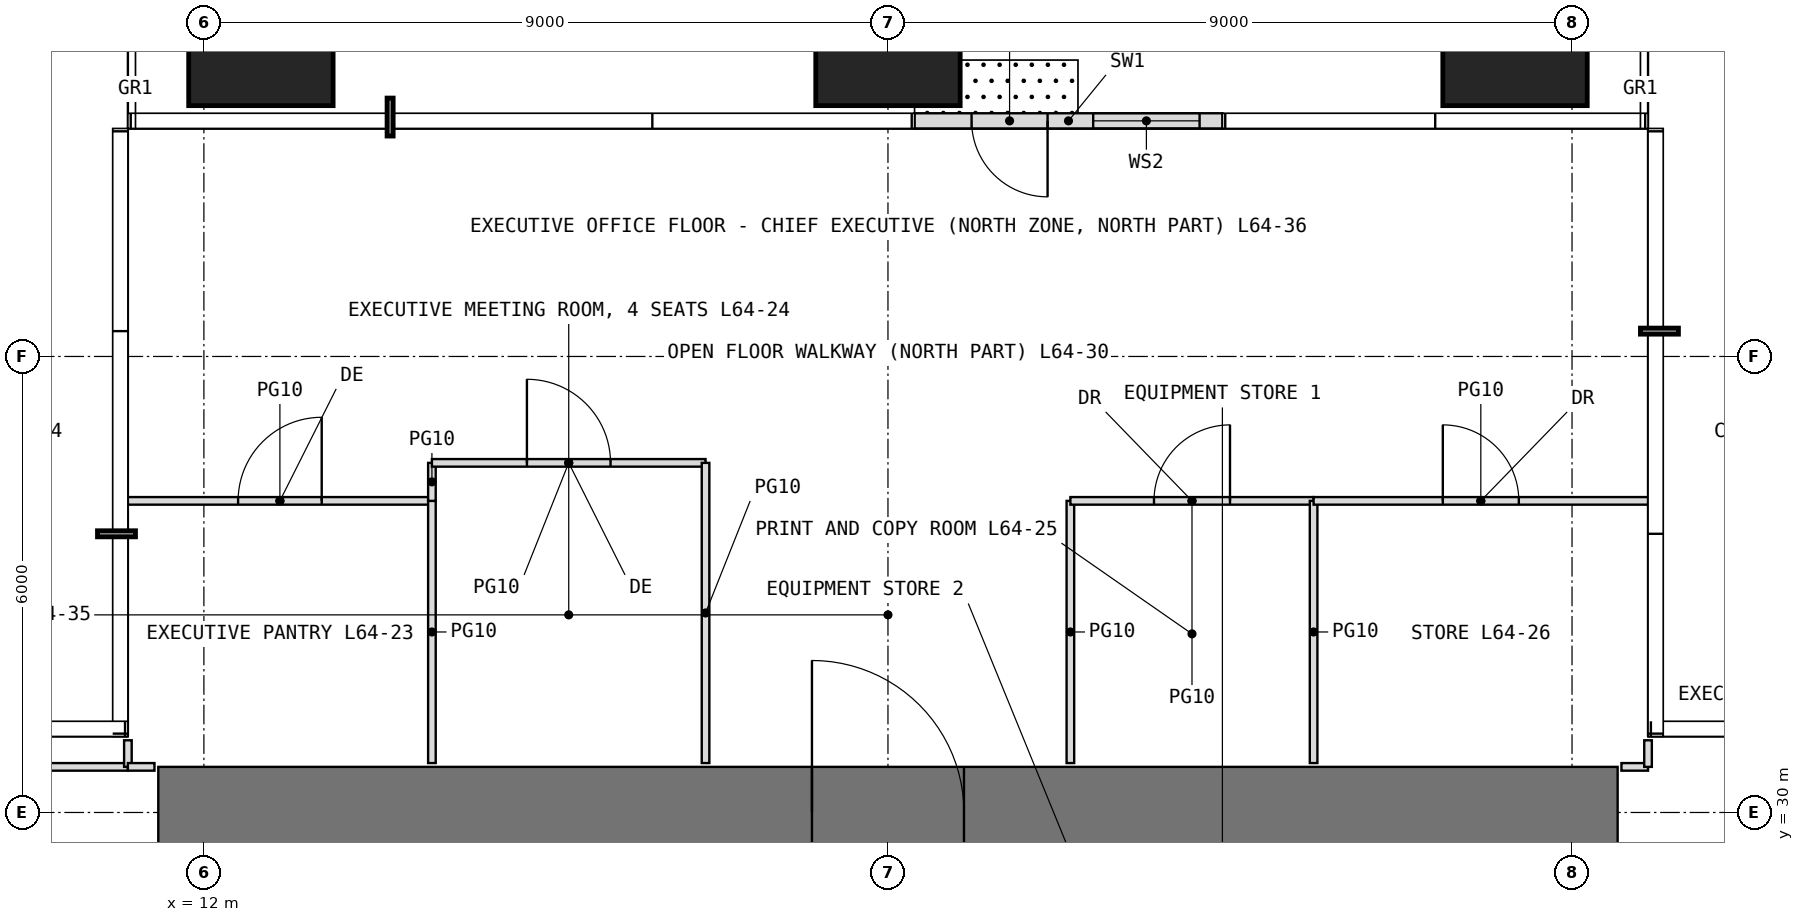
"""IFC4 building model, lengths in metres.
Left out: names, types, materials, properties, quantities, classifications, styles, units other than length and angle.
Written with IfcOpenShell. Run it as: python <this file> out.ifc"""

import sys

from ifc_helpers import new_model, si_unit, direction, frame, frame_2d, origin, origin_2d, place, context, subcontext, project, spatial, rectangle, extrude, element, fill, save


model = new_model("IFC4")
c1 = context("Model", 3, precision=1e-05, world=origin(), true_north=direction((0.0, 1.0)))
c2 = subcontext(c1, "Body", "Model", "MODEL_VIEW")
j1 = project(units=[si_unit("LENGTHUNIT", "METRE"), si_unit("PLANEANGLEUNIT", "RADIAN")], contexts=[c1])
p1 = place(None, origin())
s1 = spatial("IfcSite", under=j1, at=p1, CompositionType="ELEMENT")
p2 = place(p1, origin())
s2 = spatial("IfcBuilding", under=s1, at=p2, CompositionType="ELEMENT")
p3 = place(p2, frame((0.0, 0.0, 269.2)))
s3 = spatial("IfcBuildingStorey", under=s2, at=p3, CompositionType="ELEMENT", Elevation=269.2)
for number, where, z_axis, x_axis in (
    (1, (12.75, 40.25, 0.0), (0.0, 0.0, 1.0), (1.0, 0.0, 0.0)),
    (2, (21.0, 40.25, 0.0), (0.0, 0.0, 1.0), (1.0, 0.0, 0.0)),
    (3, (29.25, 40.25, 0.0), (0.0, 0.0, 1.0), (1.0, 0.0, 0.0)),
):
    element("IfcColumn", number, at=place(p3, frame(where, z_axis=z_axis, x_axis=x_axis)), inside=s3, PredefinedType="COLUMN", context=c2, shape_type="SweptSolid", body=[
        extrude(rectangle(XDim=1.9, YDim=1.9, at=origin_2d()), origin(), (0.0, 0.0, 1.0), 4.2),
    ])
p4 = place(p3, frame((25.4, 39.1, 0.0), z_axis=(0.0, 0.0, 1.0), x_axis=(-1.0, 0.0, 0.0)))
e4 = element("IfcWall", 4, at=p4, inside=s3, PredefinedType="USERDEFINED", context=c2, shape_type="SweptSolid", body=[
    extrude(rectangle(XDim=4.05, YDim=0.2, at=frame_2d((2.025, 0.0))), origin(), (0.0, 0.0, 1.0), 3.95),
])
p5 = place(p4, frame((2.3, 0.0, 0.0)))
e5 = element("IfcOpeningElement", 5, at=p5, cuts=e4, PredefinedType="OPENING", context=c2, shape_type="SweptSolid", body=[
    extrude(rectangle(XDim=1.0, YDim=2.4, at=frame_2d((0.5, 1.2))), frame((0.0, 0.11, 0.0), z_axis=(0.0, -1.0, 0.0), x_axis=(1.0, 0.0, 0.0)), (0.0, 0.0, 1.0), 0.22),
])
p6 = place(p4, frame((0.3, 0.0, 0.3)))
e6 = element("IfcOpeningElement", 6, at=p6, cuts=e4, PredefinedType="OPENING", context=c2, shape_type="SweptSolid", body=[
    extrude(rectangle(XDim=1.4, YDim=2.7, at=frame_2d((0.7, 1.35))), frame((0.0, 0.11, 0.0), z_axis=(0.0, -1.0, 0.0), x_axis=(1.0, 0.0, 0.0)), (0.0, 0.0, 1.0), 0.22),
])
p7 = place(p3, frame((11.4, 30.0, -0.05), z_axis=(0.0, 0.0, 1.0), x_axis=(1.0, 0.0, 0.0)))
e7 = element("IfcWall", 7, at=p7, inside=s3, PredefinedType="SHEAR", context=c2, shape_type="SweptSolid", body=[
    extrude(rectangle(XDim=19.2, YDim=1.2, at=frame_2d((9.6, 0.0))), origin(), (0.0, 0.0, 1.0), 4.2),
])
p8 = place(p7, frame((8.6, 0.0, 0.05)))
e8 = element("IfcOpeningElement", 8, at=p8, cuts=e7, PredefinedType="OPENING", context=c2, shape_type="SweptSolid", body=[
    extrude(rectangle(XDim=2.0, YDim=2.2, at=frame_2d((1.0, 1.1))), frame((0.0, 0.61, 0.0), z_axis=(0.0, -1.0, 0.0), x_axis=(1.0, 0.0, 0.0)), (0.0, 0.0, 1.0), 1.22),
])
p9 = place(p3, frame((8.4, 30.6, 0.0), z_axis=(0.0, 0.0, 1.0), x_axis=(1.0, 0.0, 0.0)))
e9 = element("IfcWall", 9, at=p9, inside=s3, PredefinedType="PARTITIONING", context=c2, shape_type="SweptSolid", body=[
    extrude(rectangle(XDim=2.6, YDim=0.1, at=frame_2d((1.3, 0.0))), origin(), (0.0, 0.0, 1.0), 3.95),
])
p10 = place(p3, frame((11.0, 30.6, 0.0), z_axis=(0.0, 0.0, 1.0), x_axis=(0.0, 1.0, 0.0)))
e10 = element("IfcWall", 10, at=p10, inside=s3, PredefinedType="PARTITIONING", context=c2, shape_type="SweptSolid", body=[
    extrude(rectangle(XDim=0.35, YDim=0.1, at=frame_2d((0.175, 0.0))), origin(), (0.0, 0.0, 1.0), 3.95),
])
p11 = place(p3, frame((11.0, 30.6, 0.0), z_axis=(0.0, 0.0, 1.0), x_axis=(1.0, 0.0, 0.0)))
e11 = element("IfcWall", 11, at=p11, inside=s3, PredefinedType="PARTITIONING", context=c2, shape_type="SweptSolid", body=[
    extrude(rectangle(XDim=0.35, YDim=0.1, at=frame_2d((0.175, 0.0))), origin(), (0.0, 0.0, 1.0), 3.95),
])
p12 = place(p3, frame((11.0, 34.1, 0.0), z_axis=(0.0, 0.0, 1.0), x_axis=(1.0, 0.0, 0.0)))
e12 = element("IfcWall", 12, at=p12, inside=s3, PredefinedType="PARTITIONING", context=c2, shape_type="SweptSolid", body=[
    extrude(rectangle(XDim=4.0, YDim=0.1, at=frame_2d((2.0, 0.0))), origin(), (0.0, 0.0, 1.0), 3.95),
])
p13 = place(p12, frame((1.45, 0.0, 0.0)))
e13 = element("IfcOpeningElement", 13, at=p13, cuts=e12, PredefinedType="OPENING", context=c2, shape_type="SweptSolid", body=[
    extrude(rectangle(XDim=1.1, YDim=2.3, at=frame_2d((0.55, 1.15))), frame((0.0, 0.06, 0.0), z_axis=(0.0, -1.0, 0.0), x_axis=(1.0, 0.0, 0.0)), (0.0, 0.0, 1.0), 0.12),
])
p14 = place(p3, frame((15.0, 30.65, 0.0), z_axis=(0.0, 0.0, 1.0), x_axis=(0.0, 1.0, 0.0)))
e14 = element("IfcWall", 14, at=p14, inside=s3, PredefinedType="PARTITIONING", context=c2, shape_type="SweptSolid", body=[
    extrude(rectangle(XDim=3.45, YDim=0.1, at=frame_2d((1.725, 0.0))), origin(), (0.0, 0.0, 1.0), 3.95),
])
p15 = place(p3, frame((15.0, 34.1, 0.0), z_axis=(0.0, 0.0, 1.0), x_axis=(0.0, 1.0, 0.0)))
e15 = element("IfcWall", 15, at=p15, inside=s3, PredefinedType="PARTITIONING", context=c2, shape_type="SweptSolid", body=[
    extrude(rectangle(XDim=0.5, YDim=0.1, at=frame_2d((0.25, 0.0))), origin(), (0.0, 0.0, 1.0), 3.95),
])
p16 = place(p3, frame((15.0, 34.6, 0.0), z_axis=(0.0, 0.0, 1.0), x_axis=(1.0, 0.0, 0.0)))
e16 = element("IfcWall", 16, at=p16, inside=s3, PredefinedType="PARTITIONING", context=c2, shape_type="SweptSolid", body=[
    extrude(rectangle(XDim=3.6, YDim=0.1, at=frame_2d((1.8, 0.0))), origin(), (0.0, 0.0, 1.0), 3.95),
])
p17 = place(p16, frame((1.25, 0.0, 0.0)))
e17 = element("IfcOpeningElement", 17, at=p17, cuts=e16, PredefinedType="OPENING", context=c2, shape_type="SweptSolid", body=[
    extrude(rectangle(XDim=1.1, YDim=2.3, at=frame_2d((0.55, 1.15))), frame((0.0, 0.06, 0.0), z_axis=(0.0, -1.0, 0.0), x_axis=(1.0, 0.0, 0.0)), (0.0, 0.0, 1.0), 0.12),
])
p18 = place(p3, frame((18.6, 30.65, 0.0), z_axis=(0.0, 0.0, 1.0), x_axis=(0.0, 1.0, 0.0)))
e18 = element("IfcWall", 18, at=p18, inside=s3, PredefinedType="PARTITIONING", context=c2, shape_type="SweptSolid", body=[
    extrude(rectangle(XDim=3.95, YDim=0.1, at=frame_2d((1.975, 0.0))), origin(), (0.0, 0.0, 1.0), 3.95),
])
p19 = place(p3, frame((23.4, 30.65, 0.0), z_axis=(0.0, 0.0, 1.0), x_axis=(0.0, 1.0, 0.0)))
e19 = element("IfcWall", 19, at=p19, inside=s3, PredefinedType="PARTITIONING", context=c2, shape_type="SweptSolid", body=[
    extrude(rectangle(XDim=3.45, YDim=0.1, at=frame_2d((1.725, 0.0))), origin(), (0.0, 0.0, 1.0), 3.95),
])
p20 = place(p3, frame((23.4, 34.1, 0.0), z_axis=(0.0, 0.0, 1.0), x_axis=(1.0, 0.0, 0.0)))
e20 = element("IfcWall", 20, at=p20, inside=s3, PredefinedType="PARTITIONING", context=c2, shape_type="SweptSolid", body=[
    extrude(rectangle(XDim=3.2, YDim=0.1, at=frame_2d((1.6, 0.0))), origin(), (0.0, 0.0, 1.0), 3.95),
])
p21 = place(p20, frame((1.1, 0.0, 0.0)))
e21 = element("IfcOpeningElement", 21, at=p21, cuts=e20, PredefinedType="OPENING", context=c2, shape_type="SweptSolid", body=[
    extrude(rectangle(XDim=1.0, YDim=2.2, at=frame_2d((0.5, 1.1))), frame((0.0, 0.06, 0.0), z_axis=(0.0, -1.0, 0.0), x_axis=(1.0, 0.0, 0.0)), (0.0, 0.0, 1.0), 0.12),
])
p22 = place(p3, frame((26.6, 30.65, 0.0), z_axis=(0.0, 0.0, 1.0), x_axis=(0.0, 1.0, 0.0)))
e22 = element("IfcWall", 22, at=p22, inside=s3, PredefinedType="PARTITIONING", context=c2, shape_type="SweptSolid", body=[
    extrude(rectangle(XDim=3.45, YDim=0.1, at=frame_2d((1.725, 0.0))), origin(), (0.0, 0.0, 1.0), 3.95),
])
p23 = place(p3, frame((26.6, 34.1, 0.0), z_axis=(0.0, 0.0, 1.0), x_axis=(1.0, 0.0, 0.0)))
e23 = element("IfcWall", 23, at=p23, inside=s3, PredefinedType="PARTITIONING", context=c2, shape_type="SweptSolid", body=[
    extrude(rectangle(XDim=4.4, YDim=0.1, at=frame_2d((2.2, 0.0))), origin(), (0.0, 0.0, 1.0), 3.95),
])
p24 = place(p23, frame((1.7, 0.0, 0.0)))
e24 = element("IfcOpeningElement", 24, at=p24, cuts=e23, PredefinedType="OPENING", context=c2, shape_type="SweptSolid", body=[
    extrude(rectangle(XDim=1.0, YDim=2.2, at=frame_2d((0.5, 1.1))), frame((0.0, 0.06, 0.0), z_axis=(0.0, -1.0, 0.0), x_axis=(1.0, 0.0, 0.0)), (0.0, 0.0, 1.0), 0.12),
])
p25 = place(p3, frame((30.65, 30.6, 0.0), z_axis=(0.0, 0.0, 1.0), x_axis=(1.0, 0.0, 0.0)))
e25 = element("IfcWall", 25, at=p25, inside=s3, PredefinedType="PARTITIONING", context=c2, shape_type="SweptSolid", body=[
    extrude(rectangle(XDim=0.35, YDim=0.1, at=frame_2d((0.175, 0.0))), origin(), (0.0, 0.0, 1.0), 3.95),
])
p26 = place(p3, frame((31.0, 30.6, 0.0), z_axis=(0.0, 0.0, 1.0), x_axis=(0.0, 1.0, 0.0)))
e26 = element("IfcWall", 26, at=p26, inside=s3, PredefinedType="PARTITIONING", context=c2, shape_type="SweptSolid", body=[
    extrude(rectangle(XDim=0.35, YDim=0.1, at=frame_2d((0.175, 0.0))), origin(), (0.0, 0.0, 1.0), 3.95),
])
p27 = place(p5, origin())
e27 = element("IfcDoor", 27, at=p27, inside=s3, OperationType="SINGLE_SWING_LEFT", PredefinedType="DOOR", context=c2, shape_type="SweptSolid", body=[
    extrude(rectangle(XDim=1.0, YDim=2.4, at=frame_2d((0.5, 1.2))), frame((0.0, 0.025, 0.0), z_axis=(0.0, -1.0, 0.0), x_axis=(1.0, 0.0, 0.0)), (0.0, 0.0, 1.0), 0.05),
])
fill(e5, e27)
p28 = place(p6, origin())
e28 = element("IfcWindow", 28, at=p28, inside=s3, PartitioningType="SINGLE_PANEL", PredefinedType="WINDOW", context=c2, shape_type="SweptSolid", body=[
    extrude(rectangle(XDim=1.4, YDim=2.7, at=frame_2d((0.7, 1.35))), frame((0.0, 0.03, 0.0), z_axis=(0.0, -1.0, 0.0), x_axis=(1.0, 0.0, 0.0)), (0.0, 0.0, 1.0), 0.06),
])
fill(e6, e28)
p29 = place(p8, origin())
e29 = element("IfcDoor", 29, at=p29, inside=s3, OperationType="DOUBLE_DOOR_SINGLE_SWING", PredefinedType="DOOR", context=c2, shape_type="SweptSolid", body=[
    extrude(rectangle(XDim=2.0, YDim=2.2, at=frame_2d((1.0, 1.1))), frame((0.0, 0.025, 0.0), z_axis=(0.0, -1.0, 0.0), x_axis=(1.0, 0.0, 0.0)), (0.0, 0.0, 1.0), 0.05),
])
fill(e8, e29)
p30 = place(p13, origin())
e30 = element("IfcDoor", 30, at=p30, inside=s3, OperationType="SINGLE_SWING_RIGHT", PredefinedType="DOOR", context=c2, shape_type="SweptSolid", body=[
    extrude(rectangle(XDim=1.1, YDim=2.3, at=frame_2d((0.55, 1.15))), frame((0.0, 0.025, 0.0), z_axis=(0.0, -1.0, 0.0), x_axis=(1.0, 0.0, 0.0)), (0.0, 0.0, 1.0), 0.05),
])
fill(e13, e30)
p31 = place(p17, origin())
e31 = element("IfcDoor", 31, at=p31, inside=s3, OperationType="SINGLE_SWING_LEFT", PredefinedType="DOOR", context=c2, shape_type="SweptSolid", body=[
    extrude(rectangle(XDim=1.1, YDim=2.3, at=frame_2d((0.55, 1.15))), frame((0.0, 0.025, 0.0), z_axis=(0.0, -1.0, 0.0), x_axis=(1.0, 0.0, 0.0)), (0.0, 0.0, 1.0), 0.05),
])
fill(e17, e31)
p32 = place(p21, origin())
e32 = element("IfcDoor", 32, at=p32, inside=s3, OperationType="SINGLE_SWING_RIGHT", PredefinedType="DOOR", context=c2, shape_type="SweptSolid", body=[
    extrude(rectangle(XDim=1.0, YDim=2.2, at=frame_2d((0.5, 1.1))), frame((0.0, 0.025, 0.0), z_axis=(0.0, -1.0, 0.0), x_axis=(1.0, 0.0, 0.0)), (0.0, 0.0, 1.0), 0.05),
])
fill(e21, e32)
p33 = place(p24, origin())
e33 = element("IfcDoor", 33, at=p33, inside=s3, OperationType="SINGLE_SWING_LEFT", PredefinedType="DOOR", context=c2, shape_type="SweptSolid", body=[
    extrude(rectangle(XDim=1.0, YDim=2.2, at=frame_2d((0.5, 1.1))), frame((0.0, 0.025, 0.0), z_axis=(0.0, -1.0, 0.0), x_axis=(1.0, 0.0, 0.0)), (0.0, 0.0, 1.0), 0.05),
])
fill(e24, e33)
save(model, sys.argv[1])
